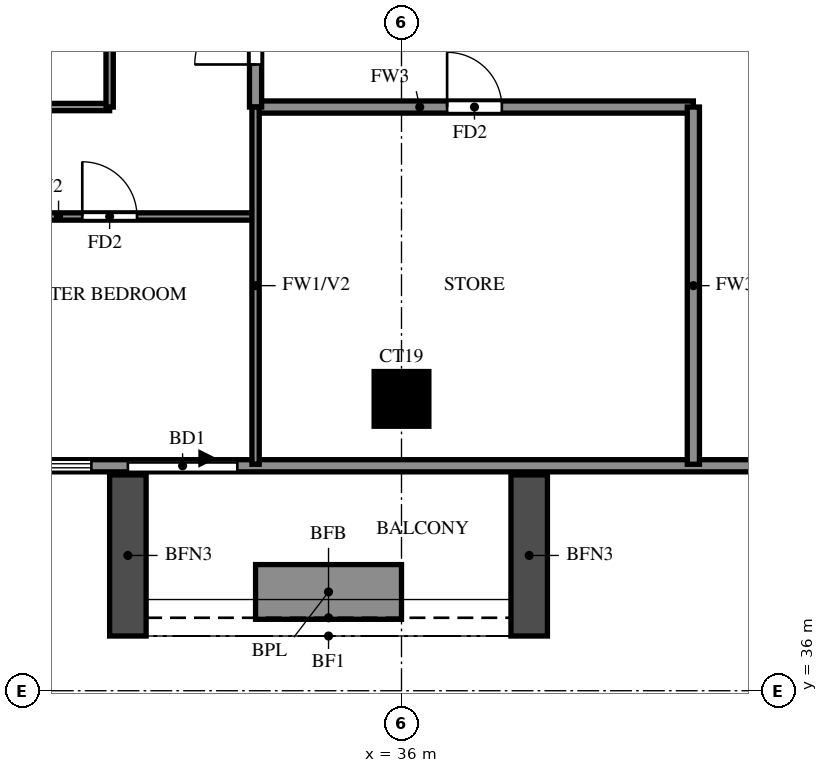
"""IFC4 building model, lengths in metres.
Left out: names, types, materials, properties, quantities, classifications, styles, units other than length and angle.
Written with IfcOpenShell. Run it as: python <this file> out.ifc"""

import sys

from ifc_helpers import new_model, si_unit, direction, frame, frame_2d, origin, origin_2d, place, context, subcontext, project, spatial, rectangle, extrude, source, transform, mapped, element, fill, save


model = new_model("IFC4")
c1 = context("Model", 3, precision=1e-05, world=origin(), true_north=direction((0.0, 1.0)))
c2 = subcontext(c1, "Body", "Model", "MODEL_VIEW")
j1 = project(units=[si_unit("LENGTHUNIT", "METRE"), si_unit("PLANEANGLEUNIT", "RADIAN")], contexts=[c1])
p1 = place(None, origin())
s1 = spatial("IfcSite", under=j1, at=p1, CompositionType="ELEMENT")
p2 = place(p1, origin())
s2 = spatial("IfcBuilding", under=s1, at=p2, CompositionType="ELEMENT")
p3 = place(p2, frame((0.0, 0.0, 195.5)))
s3 = spatial("IfcBuildingStorey", under=s2, at=p3, CompositionType="ELEMENT", Elevation=195.5)
m1 = source(origin(), c2, "Body", "SweptSolid", [
    extrude(rectangle(XDim=0.9, YDim=0.9, at=origin_2d()), origin(), (0.0, 0.0, 1.0), 3.2),
])
p4 = place(p3, frame((36.0, 40.8, 0.0), z_axis=(0.0, 0.0, 1.0), x_axis=(1.0, 0.0, 0.0)))
e1 = element("IfcColumn", 1, at=p4, inside=s3, PredefinedType="COLUMN", context=c2, shape_type="MappedRepresentation", body=[
    mapped(m1, transform((0.0, 0.0, 0.0))),
])
p5 = place(p3, frame((18.2, 39.7, 0.0), z_axis=(0.0, 0.0, 1.0), x_axis=(1.0, 0.0, 0.0)))
e2 = element("IfcWall", 2, at=p5, inside=s3, PredefinedType="SOLIDWALL", context=c2, shape_type="SweptSolid", body=[
    extrude(rectangle(XDim=23.8, YDim=0.2, at=frame_2d((11.9, 0.0))), origin(), (0.0, 0.0, 1.0), 3.2),
])
p6 = place(p5, frame((13.3, 0.0, 0.0)))
e3 = element("IfcOpeningElement", 3, at=p6, cuts=e2, PredefinedType="OPENING", context=c2, shape_type="SweptSolid", body=[
    extrude(rectangle(XDim=1.8, YDim=2.4, at=frame_2d((0.9, 1.2))), frame((0.0, 0.11, 0.0), z_axis=(0.0, -1.0, 0.0), x_axis=(1.0, 0.0, 0.0)), (0.0, 0.0, 1.0), 0.22),
])
p7 = place(p5, frame((0.9, 0.0, 0.6)))
e4 = element("IfcOpeningElement", 4, at=p7, cuts=e2, PredefinedType="OPENING", context=c2, shape_type="SweptSolid", body=[
    extrude(rectangle(XDim=2.4, YDim=2.4, at=frame_2d((1.2, 1.2))), frame((0.0, 0.11, 0.0), z_axis=(0.0, -1.0, 0.0), x_axis=(1.0, 0.0, 0.0)), (0.0, 0.0, 1.0), 0.22),
])
p8 = place(p5, frame((3.9, 0.0, 0.6)))
e5 = element("IfcOpeningElement", 5, at=p8, cuts=e2, PredefinedType="OPENING", context=c2, shape_type="SweptSolid", body=[
    extrude(rectangle(XDim=2.4, YDim=2.4, at=frame_2d((1.2, 1.2))), frame((0.0, 0.11, 0.0), z_axis=(0.0, -1.0, 0.0), x_axis=(1.0, 0.0, 0.0)), (0.0, 0.0, 1.0), 0.22),
])
p9 = place(p5, frame((10.9, 0.0, 0.6)))
e6 = element("IfcOpeningElement", 6, at=p9, cuts=e2, PredefinedType="OPENING", context=c2, shape_type="SweptSolid", body=[
    extrude(rectangle(XDim=1.8, YDim=2.4, at=frame_2d((0.9, 1.2))), frame((0.0, 0.11, 0.0), z_axis=(0.0, -1.0, 0.0), x_axis=(1.0, 0.0, 0.0)), (0.0, 0.0, 1.0), 0.22),
])
p10 = place(p5, frame((8.35, 0.0, 1.5)))
e7 = element("IfcOpeningElement", 7, at=p10, cuts=e2, PredefinedType="OPENING", context=c2, shape_type="SweptSolid", body=[
    extrude(rectangle(XDim=0.9, YDim=0.9, at=frame_2d((0.45, 0.45))), frame((0.0, 0.11, 0.0), z_axis=(0.0, -1.0, 0.0), x_axis=(1.0, 0.0, 0.0)), (0.0, 0.0, 1.0), 0.22),
])
for number, where, z_axis, x_axis in (
    (8, (31.5, 39.55, 0.0), (0.0, 0.0, 1.0), (0.0, -1.0, 0.0)),
    (9, (38.1, 39.55, 0.0), (0.0, 0.0, 1.0), (0.0, -1.0, 0.0)),
):
    element("IfcWall", number, at=place(p3, frame(where, z_axis=z_axis, x_axis=x_axis)), inside=s3, PredefinedType="SOLIDWALL", context=c2, shape_type="SweptSolid", body=[
        extrude(rectangle(XDim=2.65, YDim=0.6, at=frame_2d((1.325, 0.0))), origin(), (0.0, 0.0, 1.0), 2.85),
    ])
p11 = place(p3, frame((33.6, 37.625, 0.0), z_axis=(0.0, 0.0, 1.0), x_axis=(1.0, 0.0, 0.0)))
e10 = element("IfcWall", 10, at=p11, inside=s3, PredefinedType="SOLIDWALL", context=c2, shape_type="SweptSolid", body=[
    extrude(rectangle(XDim=2.4, YDim=0.9, at=frame_2d((1.2, 0.0))), origin(), (0.0, 0.0, 1.0), 0.9),
])
p12 = place(p3, frame((33.6, 45.6, 0.0), z_axis=(0.0, 0.0, 1.0), x_axis=(1.0, 0.0, 0.0)))
e11 = element("IfcWall", 11, at=p12, inside=s3, PredefinedType="SOLIDWALL", context=c2, shape_type="SweptSolid", body=[
    extrude(rectangle(XDim=7.2, YDim=0.2, at=frame_2d((3.6, 0.0))), origin(), (0.0, 0.0, 1.0), 3.2),
])
p13 = place(p12, frame((3.15, 0.0, 0.0)))
e12 = element("IfcOpeningElement", 12, at=p13, cuts=e11, PredefinedType="OPENING", context=c2, shape_type="SweptSolid", body=[
    extrude(rectangle(XDim=0.9, YDim=2.1, at=frame_2d((0.45, 1.05))), frame((0.0, 0.11, 0.0), z_axis=(0.0, -1.0, 0.0), x_axis=(1.0, 0.0, 0.0)), (0.0, 0.0, 1.0), 0.22),
])
p14 = place(p3, frame((33.6, 45.6, 0.0), z_axis=(0.0, 0.0, 1.0), x_axis=(0.0, 1.0, 0.0)))
e13 = element("IfcWall", 13, at=p14, inside=s3, PredefinedType="SOLIDWALL", context=c2, shape_type="SweptSolid", body=[
    extrude(rectangle(XDim=16.8, YDim=0.2, at=frame_2d((8.4, 0.0))), origin(), (0.0, 0.0, 1.0), 3.2),
])
p15 = place(p14, frame((0.7, 0.0, 0.0)))
e14 = element("IfcOpeningElement", 14, at=p15, cuts=e13, PredefinedType="OPENING", context=c2, shape_type="SweptSolid", body=[
    extrude(rectangle(XDim=1.0, YDim=2.1, at=frame_2d((0.5, 1.05))), frame((0.0, 0.11, 0.0), z_axis=(0.0, -1.0, 0.0), x_axis=(1.0, 0.0, 0.0)), (0.0, 0.0, 1.0), 0.22),
])
p16 = place(p14, frame((8.3, 0.0, 0.0)))
e15 = element("IfcOpeningElement", 15, at=p16, cuts=e13, PredefinedType="OPENING", context=c2, shape_type="SweptSolid", body=[
    extrude(rectangle(XDim=1.0, YDim=2.1, at=frame_2d((0.5, 1.05))), frame((0.0, 0.11, 0.0), z_axis=(0.0, -1.0, 0.0), x_axis=(1.0, 0.0, 0.0)), (0.0, 0.0, 1.0), 0.22),
])
p17 = place(p14, frame((15.1, 0.0, 0.0)))
e16 = element("IfcOpeningElement", 16, at=p17, cuts=e13, PredefinedType="OPENING", context=c2, shape_type="SweptSolid", body=[
    extrude(rectangle(XDim=1.0, YDim=2.1, at=frame_2d((0.5, 1.05))), frame((0.0, 0.11, 0.0), z_axis=(0.0, -1.0, 0.0), x_axis=(1.0, 0.0, 0.0)), (0.0, 0.0, 1.0), 0.22),
])
p18 = place(p3, frame((40.8, 39.725, 0.0), z_axis=(0.0, 0.0, 1.0), x_axis=(0.0, 1.0, 0.0)))
e17 = element("IfcWall", 17, at=p18, inside=s3, PredefinedType="SOLIDWALL", context=c2, shape_type="SweptSolid", body=[
    extrude(rectangle(XDim=5.875, YDim=0.2, at=frame_2d((2.938, 0.0))), origin(), (0.0, 0.0, 1.0), 3.2),
])
p19 = place(p3, frame((28.8, 43.8, 0.0), z_axis=(0.0, 0.0, 1.0), x_axis=(1.0, 0.0, 0.0)))
e18 = element("IfcWall", 18, at=p19, inside=s3, PredefinedType="PARTITIONING", context=c2, shape_type="SweptSolid", body=[
    extrude(rectangle(XDim=4.8, YDim=0.12, at=frame_2d((2.4, 0.0))), origin(), (0.0, 0.0, 1.0), 3.2),
])
p20 = place(p19, frame((1.95, 0.0, 0.0)))
e19 = element("IfcOpeningElement", 19, at=p20, cuts=e18, PredefinedType="OPENING", context=c2, shape_type="SweptSolid", body=[
    extrude(rectangle(XDim=0.9, YDim=2.1, at=frame_2d((0.45, 1.05))), frame((0.0, 0.07, 0.0), z_axis=(0.0, -1.0, 0.0), x_axis=(1.0, 0.0, 0.0)), (0.0, 0.0, 1.0), 0.14),
])
p21 = place(p3, frame((25.2, 45.6, 0.0), z_axis=(0.0, 0.0, 1.0), x_axis=(1.0, 0.0, 0.0)))
e20 = element("IfcWall", 20, at=p21, inside=s3, PredefinedType="PARTITIONING", context=c2, shape_type="SweptSolid", body=[
    extrude(rectangle(XDim=6.0, YDim=0.12, at=frame_2d((3.0, 0.0))), origin(), (0.0, 0.0, 1.0), 3.2),
])
p22 = place(p21, frame((2.55, 0.0, 0.0)))
e21 = element("IfcOpeningElement", 21, at=p22, cuts=e20, PredefinedType="OPENING", context=c2, shape_type="SweptSolid", body=[
    extrude(rectangle(XDim=0.9, YDim=2.1, at=frame_2d((0.45, 1.05))), frame((0.0, 0.07, 0.0), z_axis=(0.0, -1.0, 0.0), x_axis=(1.0, 0.0, 0.0)), (0.0, 0.0, 1.0), 0.14),
])
p23 = place(p3, frame((31.2, 45.6, 0.0), z_axis=(0.0, 0.0, 1.0), x_axis=(0.0, 1.0, 0.0)))
e22 = element("IfcWall", 22, at=p23, inside=s3, PredefinedType="PARTITIONING", context=c2, shape_type="SweptSolid", body=[
    extrude(rectangle(XDim=2.4, YDim=0.12, at=frame_2d((1.2, 0.0))), origin(), (0.0, 0.0, 1.0), 3.2),
])
p24 = place(p3, frame((33.6, 39.725, 0.0), z_axis=(0.0, 0.0, 1.0), x_axis=(0.0, 1.0, 0.0)))
e23 = element("IfcWall", 23, at=p24, inside=s3, PredefinedType="PARTITIONING", context=c2, shape_type="SweptSolid", body=[
    extrude(rectangle(XDim=5.875, YDim=0.12, at=frame_2d((2.938, 0.0))), origin(), (0.0, 0.0, 1.0), 3.2),
])
p25 = place(p6, origin())
e24 = element("IfcDoor", 24, at=p25, inside=s3, OperationType="DOUBLE_DOOR_SLIDING", PredefinedType="DOOR", context=c2, shape_type="SweptSolid", body=[
    extrude(rectangle(XDim=1.8, YDim=2.4, at=frame_2d((0.9, 1.2))), frame((0.0, 0.025, 0.0), z_axis=(0.0, -1.0, 0.0), x_axis=(1.0, 0.0, 0.0)), (0.0, 0.0, 1.0), 0.05),
])
fill(e3, e24)
p26 = place(p9, origin())
e25 = element("IfcWindow", 25, at=p26, inside=s3, PartitioningType="DOUBLE_PANEL_VERTICAL", PredefinedType="WINDOW", context=c2, shape_type="SweptSolid", body=[
    extrude(rectangle(XDim=1.8, YDim=2.4, at=frame_2d((0.9, 1.2))), frame((0.0, 0.03, 0.0), z_axis=(0.0, -1.0, 0.0), x_axis=(1.0, 0.0, 0.0)), (0.0, 0.0, 1.0), 0.06),
])
fill(e6, e25)
p27 = place(p15, origin())
e26 = element("IfcDoor", 26, at=p27, inside=s3, OperationType="SINGLE_SWING_LEFT", PredefinedType="DOOR", context=c2, shape_type="SweptSolid", body=[
    extrude(rectangle(XDim=1.0, YDim=2.1, at=frame_2d((0.5, 1.05))), frame((0.0, 0.025, 0.0), z_axis=(0.0, -1.0, 0.0), x_axis=(1.0, 0.0, 0.0)), (0.0, 0.0, 1.0), 0.05),
])
fill(e14, e26)
p28 = place(p20, origin())
e27 = element("IfcDoor", 27, at=p28, inside=s3, OperationType="SINGLE_SWING_RIGHT", PredefinedType="DOOR", context=c2, shape_type="SweptSolid", body=[
    extrude(rectangle(XDim=0.9, YDim=2.1, at=frame_2d((0.45, 1.05))), frame((0.0, 0.025, 0.0), z_axis=(0.0, -1.0, 0.0), x_axis=(1.0, 0.0, 0.0)), (0.0, 0.0, 1.0), 0.05),
])
fill(e19, e27)
p29 = place(p13, origin())
e28 = element("IfcDoor", 28, at=p29, inside=s3, OperationType="SINGLE_SWING_RIGHT", PredefinedType="DOOR", context=c2, shape_type="SweptSolid", body=[
    extrude(rectangle(XDim=0.9, YDim=2.1, at=frame_2d((0.45, 1.05))), frame((0.0, 0.025, 0.0), z_axis=(0.0, -1.0, 0.0), x_axis=(1.0, 0.0, 0.0)), (0.0, 0.0, 1.0), 0.05),
])
fill(e12, e28)
save(model, sys.argv[1])
